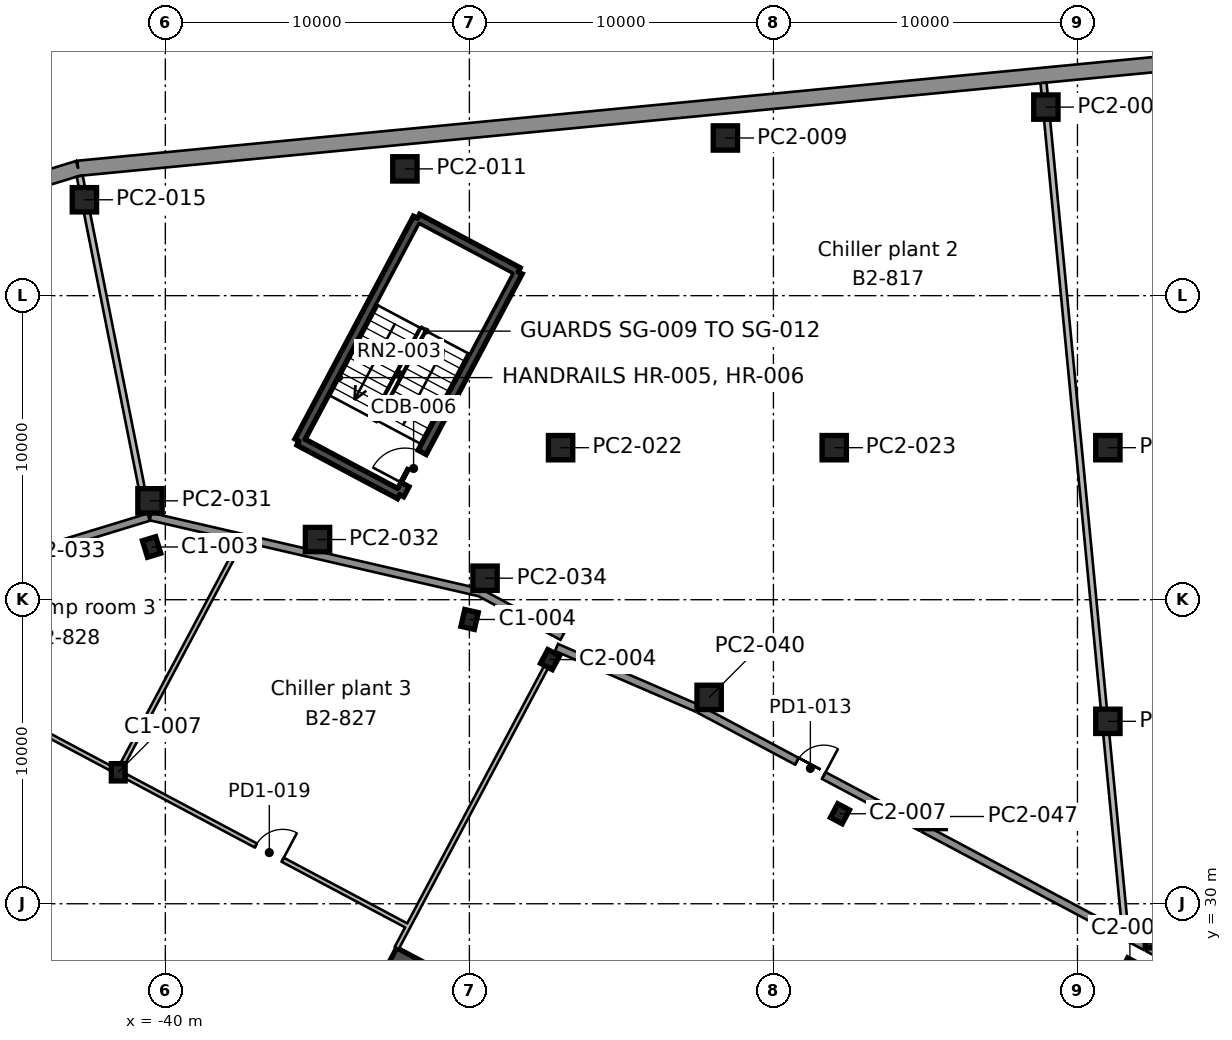
"""IFC4 building model, lengths in metres.
Left out: names, types, materials, properties, quantities, classifications, styles, units other than length and angle.
Written with IfcOpenShell. Run it as: python <this file> out.ifc"""

import sys

from ifc_helpers import new_model, si_unit, direction, frame, frame_2d, origin, origin_2d, place, context, subcontext, project, spatial, rectangle, i_section, extrude, element, fill, save


model = new_model("IFC4")
c1 = context("Model", 3, precision=1e-05, world=origin(), true_north=direction((0.0, 1.0)))
c2 = subcontext(c1, "Body", "Model", "MODEL_VIEW")
j1 = project(units=[si_unit("LENGTHUNIT", "METRE"), si_unit("PLANEANGLEUNIT", "RADIAN")], contexts=[c1])
p1 = place(None, origin())
s1 = spatial("IfcSite", under=j1, at=p1, CompositionType="ELEMENT")
p2 = place(p1, origin())
s2 = spatial("IfcBuilding", under=s1, at=p2, CompositionType="ELEMENT")
p3 = place(p2, frame((0.0, 0.0, -9.0)))
s3 = spatial("IfcBuildingStorey", under=s2, at=p3, CompositionType="ELEMENT", Elevation=-9.0)
for number, where, z_axis, x_axis in (
    (1, (-8.275, 27.89, 0.0), (0.0, 0.0, 1.0), (-0.883, 0.469, 0.0)),
    (2, (-17.811, 32.96, 0.0), (0.0, 0.0, 1.0), (-0.883, 0.469, 0.0)),
):
    element("IfcColumn", number, at=place(p3, frame(where, z_axis=z_axis, x_axis=x_axis)), inside=s3, PredefinedType="COLUMN", context=c2, shape_type="SweptSolid", body=[
        extrude(i_section(OverallWidth=0.437, OverallDepth=0.513, WebThickness=0.061, FlangeThickness=0.097, FilletRadius=0.015, at=origin_2d()), origin(), (0.0, 0.0, 1.0), 4.5),
    ])
p4 = place(p3, frame((-41.549, 34.324, 0.0), z_axis=(0.0, 0.0, 1.0), x_axis=(1.0, 0.0, 0.0)))
e3 = element("IfcColumn", 3, at=p4, inside=s3, PredefinedType="COLUMN", context=c2, shape_type="SweptSolid", body=[
    extrude(i_section(OverallWidth=0.455, OverallDepth=0.569, WebThickness=0.078, FlangeThickness=0.125, FilletRadius=0.015, at=origin_2d()), origin(), (0.0, 0.0, 1.0), 4.5),
])
p5 = place(p3, frame((-27.347, 38.03, 0.0), z_axis=(0.0, 0.0, 1.0), x_axis=(-0.882947592859, 0.469471562786, 0.0)))
e4 = element("IfcColumn", 4, at=p5, inside=s3, PredefinedType="COLUMN", context=c2, shape_type="SweptSolid", body=[
    extrude(i_section(OverallWidth=0.437, OverallDepth=0.513, WebThickness=0.061, FlangeThickness=0.097, FilletRadius=0.015, at=origin_2d()), origin(), (0.0, 0.0, 1.0), 4.5),
])
for number, where, z_axis, x_axis in (
    (5, (-29.993, 39.35, 0.0), (0.0, 0.0, 1.0), (-0.974, 0.225, 0.0)),
    (6, (-40.452, 41.734, 0.0), (0.0, 0.0, 1.0), (-0.956, -0.292, 0.0)),
):
    element("IfcColumn", number, at=place(p3, frame(where, z_axis=z_axis, x_axis=x_axis)), inside=s3, PredefinedType="COLUMN", context=c2, shape_type="SweptSolid", body=[
        extrude(i_section(OverallWidth=0.455, OverallDepth=0.569, WebThickness=0.078, FlangeThickness=0.125, FilletRadius=0.015, at=origin_2d()), origin(), (0.0, 0.0, 1.0), 4.5),
    ])
p6 = place(p3, frame((-31.992, 28.336, 0.0), z_axis=(0.0, 0.0, 1.0), x_axis=(-0.46947084998, -0.882947971864, 0.0)))
e7 = element("IfcWall", 7, at=p6, inside=s3, PredefinedType="SHEAR", context=c2, shape_type="SweptSolid", body=[
    extrude(rectangle(XDim=20.0, YDim=0.9, at=frame_2d((10.0, 0.0))), origin(), (0.0, 0.0, 1.0), 4.5),
])
p7 = place(p6, frame((10.6, 0.0, 0.0)))
e8 = element("IfcOpeningElement", 8, at=p7, cuts=e7, PredefinedType="OPENING", context=c2, shape_type="SweptSolid", body=[
    extrude(rectangle(XDim=2.4, YDim=2.4, at=frame_2d((1.2, 1.2))), frame((0.0, 0.46, 0.0), z_axis=(0.0, -1.0, 0.0), x_axis=(1.0, 0.0, 0.0)), (0.0, 0.0, 1.0), 0.92),
])
p8 = place(p3, frame((-31.707, 52.544, 0.0), z_axis=(0.0, 0.0, 1.0), x_axis=(0.882948761726, -0.46946936446, 0.0)))
e9 = element("IfcWall", 9, at=p8, inside=s3, PredefinedType="SHEAR", context=c2, shape_type="SweptSolid", body=[
    extrude(rectangle(XDim=3.75, YDim=0.3, at=frame_2d((1.875, 0.0))), origin(), (0.0, 0.0, 1.0), 4.5),
])
p9 = place(p3, frame((-28.396, 50.784, 0.0), z_axis=(0.0, 0.0, 1.0), x_axis=(-0.469464178475, -0.882951519127, 0.0)))
e10 = element("IfcWall", 10, at=p9, inside=s3, PredefinedType="SHEAR", context=c2, shape_type="SweptSolid", body=[
    extrude(rectangle(XDim=8.3, YDim=0.3, at=frame_2d((4.15, 0.0))), origin(), (0.0, 0.0, 1.0), 4.5),
])
p10 = place(p9, frame((6.725, 0.0, 0.0)))
e11 = element("IfcOpeningElement", 11, at=p10, cuts=e10, PredefinedType="OPENING", context=c2, shape_type="SweptSolid", body=[
    extrude(rectangle(XDim=1.2, YDim=2.1, at=frame_2d((0.6, 1.05))), frame((0.0, 0.16, 0.0), z_axis=(0.0, -1.0, 0.0), x_axis=(1.0, 0.0, 0.0)), (0.0, 0.0, 1.0), 0.32),
])
p11 = place(p3, frame((-32.293, 43.456, 0.0), z_axis=(0.0, 0.0, 1.0), x_axis=(-0.882948761726, 0.46946936446, 0.0)))
e12 = element("IfcWall", 12, at=p11, inside=s3, PredefinedType="SHEAR", context=c2, shape_type="SweptSolid", body=[
    extrude(rectangle(XDim=3.75, YDim=0.3, at=frame_2d((1.875, 0.0))), origin(), (0.0, 0.0, 1.0), 4.5),
])
p12 = place(p3, frame((-35.604, 45.216, 0.0), z_axis=(0.0, 0.0, 1.0), x_axis=(0.469464178475, 0.882951519127, 0.0)))
e13 = element("IfcWall", 13, at=p12, inside=s3, PredefinedType="SHEAR", context=c2, shape_type="SweptSolid", body=[
    extrude(rectangle(XDim=8.3, YDim=0.3, at=frame_2d((4.15, 0.0))), origin(), (0.0, 0.0, 1.0), 4.5),
])
p13 = place(p3, frame((52.315, 63.363, 0.0), z_axis=(0.0, 0.0, 1.0), x_axis=(-0.995387233017, -0.095938815644, 0.0)))
e14 = element("IfcWall", 14, at=p13, inside=s3, PredefinedType="SOLIDWALL", context=c2, shape_type="SweptSolid", body=[
    extrude(rectangle(XDim=95.624, YDim=0.5, at=frame_2d((47.812, 0.0))), origin(), (0.0, 0.0, 1.0), 4.5),
])
p14 = place(p3, frame((-42.868, 54.189, 0.0), z_axis=(0.0, 0.0, 1.0), x_axis=(-0.956302408896, -0.292379381524, 0.0)))
e15 = element("IfcWall", 15, at=p14, inside=s3, PredefinedType="SOLIDWALL", context=c2, shape_type="SweptSolid", body=[
    extrude(rectangle(XDim=15.386, YDim=0.5, at=frame_2d((7.693, 0.0))), origin(), (0.0, 0.0, 1.0), 4.5),
])
for number, where, z_axis, x_axis in (
    (16, (-7.371, 28.949, 0.0), (0.0, 0.0, 1.0), (1.0, 0.0, 0.0)),
    (17, (-14.743, 32.869, 0.0), (0.0, 0.0, 1.0), (1.0, 0.0, 0.0)),
    (18, (-9.0, 36.0, 0.0), (0.0, 0.0, 1.0), (1.0, 0.0, 0.0)),
    (19, (-22.114, 36.788, 0.0), (0.0, 0.0, 1.0), (1.0, 0.0, 0.0)),
    (20, (-29.485, 40.707, 0.0), (0.0, 0.0, 1.0), (1.0, 0.0, 0.0)),
    (21, (-34.995, 41.979, 0.0), (0.0, 0.0, 1.0), (1.0, 0.0, 0.0)),
    (22, (-40.505, 43.252, 0.0), (0.0, 0.0, 1.0), (1.0, 0.0, 0.0)),
    (23, (-27.0, 45.0, 0.0), (0.0, 0.0, 1.0), (1.0, 0.0, 0.0)),
    (24, (-18.0, 45.0, 0.0), (0.0, 0.0, 1.0), (1.0, 0.0, 0.0)),
    (25, (-9.0, 45.0, 0.0), (0.0, 0.0, 1.0), (1.0, 0.0, 0.0)),
    (26, (-42.662, 53.154, 0.0), (0.0, 0.0, 1.0), (1.0, 0.0, 0.0)),
    (27, (-32.121, 54.17, 0.0), (0.0, 0.0, 1.0), (1.0, 0.0, 0.0)),
    (28, (-21.58, 55.186, 0.0), (0.0, 0.0, 1.0), (1.0, 0.0, 0.0)),
    (29, (-11.039, 56.202, 0.0), (0.0, 0.0, 1.0), (1.0, 0.0, 0.0)),
):
    element("IfcColumn", number, at=place(p3, frame(where, z_axis=z_axis, x_axis=x_axis)), inside=s3, PredefinedType="COLUMN", context=c2, shape_type="SweptSolid", body=[
        extrude(rectangle(XDim=0.8, YDim=0.8, at=origin_2d()), origin(), (0.0, 0.0, 1.0), 4.1),
    ])
p15 = place(p3, frame((-11.116, 56.998, 0.0), z_axis=(0.0, 0.0, 1.0), x_axis=(0.095794311802, -0.995401150203, 0.0)))
e30 = element("IfcWall", 30, at=p15, inside=s3, PredefinedType="PARTITIONING", context=c2, shape_type="SweptSolid", body=[
    extrude(rectangle(XDim=0.397, YDim=0.2, at=frame_2d((0.199, 0.0))), origin(), (0.0, 0.0, 1.0), 4.1),
])
p16 = place(p3, frame((-11.001, 55.802, 0.0), z_axis=(0.0, 0.0, 1.0), x_axis=(0.095942712783, -0.99538685739, 0.0)))
e31 = element("IfcWall", 31, at=p16, inside=s3, PredefinedType="PARTITIONING", context=c2, shape_type="SweptSolid", body=[
    extrude(rectangle(XDim=19.492, YDim=0.2, at=frame_2d((9.746, 0.0))), origin(), (0.0, 0.0, 1.0), 4.1),
])
p17 = place(p3, frame((-9.054, 35.6, 0.0), z_axis=(0.0, 0.0, 1.0), x_axis=(0.095939612703, -0.995387156193, 0.0)))
e32 = element("IfcWall", 32, at=p17, inside=s3, PredefinedType="PARTITIONING", context=c2, shape_type="SweptSolid", body=[
    extrude(rectangle(XDim=6.695, YDim=0.2, at=frame_2d((3.348, 0.0))), origin(), (0.0, 0.0, 1.0), 4.1),
])
p18 = place(p3, frame((-8.407, 28.933, 0.0), z_axis=(0.0, 0.0, 1.0), x_axis=(0.88302789325, -0.469320508547, 0.0)))
e33 = element("IfcWall", 33, at=p18, inside=s3, PredefinedType="SOLIDWALL", context=c2, shape_type="SweptSolid", body=[
    extrude(rectangle(XDim=0.72, YDim=0.25, at=frame_2d((0.36, 0.0))), origin(), (0.0, 0.0, 1.0), 4.1),
])
p19 = place(p3, frame((-7.684, 28.549, 0.0), z_axis=(0.0, 0.0, 1.0), x_axis=(0.882947828207, -0.46947112016, 0.0)))
e34 = element("IfcWall", 34, at=p19, inside=s3, PredefinedType="SOLIDWALL", context=c2, shape_type="SweptSolid", body=[
    extrude(rectangle(XDim=8.249, YDim=0.25, at=frame_2d((4.125, 0.0))), origin(), (0.0, 0.0, 1.0), 4.1),
])
p20 = place(p19, frame((3.625, 0.0, 0.0)))
e35 = element("IfcOpeningElement", 35, at=p20, cuts=e34, PredefinedType="OPENING", context=c2, shape_type="SweptSolid", body=[
    extrude(rectangle(XDim=1.0, YDim=2.1, at=frame_2d((0.5, 1.05))), frame((0.0, 0.135, 0.0), z_axis=(0.0, -1.0, 0.0), x_axis=(1.0, 0.0, 0.0)), (0.0, 0.0, 1.0), 0.27),
])
p21 = place(p3, frame((-42.817, 53.932, 0.0), z_axis=(0.0, 0.0, 1.0), x_axis=(0.194899081762, -0.980823301073, 0.0)))
e36 = element("IfcWall", 36, at=p21, inside=s3, PredefinedType="PARTITIONING", context=c2, shape_type="SweptSolid", body=[
    extrude(rectangle(XDim=0.386, YDim=0.2, at=frame_2d((0.193, 0.0))), origin(), (0.0, 0.0, 1.0), 4.1),
])
p22 = place(p3, frame((-42.583, 52.754, 0.0), z_axis=(0.0, 0.0, 1.0), x_axis=(0.195149741705, -0.980773459221, 0.0)))
e37 = element("IfcWall", 37, at=p22, inside=s3, PredefinedType="PARTITIONING", context=c2, shape_type="SweptSolid", body=[
    extrude(rectangle(XDim=9.28, YDim=0.2, at=frame_2d((4.64, 0.0))), origin(), (0.0, 0.0, 1.0), 4.1),
])
p23 = place(p3, frame((-37.45, 42.033, 0.0), z_axis=(0.0, 0.0, 1.0), x_axis=(0.97436957048, -0.224953195404, 0.0)))
e38 = element("IfcWall", 38, at=p23, inside=s3, PredefinedType="SOLIDWALL", context=c2, shape_type="SweptSolid", body=[
    extrude(rectangle(XDim=7.993, YDim=0.25, at=frame_2d((3.997, 0.0))), origin(), (0.0, 0.0, 1.0), 4.1),
])
p24 = place(p3, frame((-29.662, 40.235, 0.0), z_axis=(0.0, 0.0, 1.0), x_axis=(0.882951412921, -0.469464378224, 0.0)))
e39 = element("IfcWall", 39, at=p24, inside=s3, PredefinedType="SOLIDWALL", context=c2, shape_type="SweptSolid", body=[
    extrude(rectangle(XDim=3.079, YDim=0.25, at=frame_2d((1.54, 0.0))), origin(), (0.0, 0.0, 1.0), 4.1),
])
p25 = place(p3, frame((-40.487, 42.734, 0.0), z_axis=(0.0, 0.0, 1.0), x_axis=(0.974387235192, -0.224876668186, 0.0)))
e40 = element("IfcWall", 40, at=p25, inside=s3, PredefinedType="SOLIDWALL", context=c2, shape_type="SweptSolid", body=[
    extrude(rectangle(XDim=3.117, YDim=0.25, at=frame_2d((1.559, 0.0))), origin(), (0.0, 0.0, 1.0), 4.1),
])
p26 = place(p3, frame((-27.134, 38.43, 0.0), z_axis=(0.0, 0.0, 1.0), x_axis=(0.918029849315, -0.396511280756, 0.0)))
e41 = element("IfcWall", 41, at=p26, inside=s3, PredefinedType="SOLIDWALL", context=c2, shape_type="SweptSolid", body=[
    extrude(rectangle(XDim=5.033, YDim=0.25, at=frame_2d((2.517, 0.0))), origin(), (0.0, 0.0, 1.0), 4.1),
])
p27 = place(p3, frame((-22.427, 36.388, 0.0), z_axis=(0.0, 0.0, 1.0), x_axis=(0.882947828207, -0.46947112016, 0.0)))
e42 = element("IfcWall", 42, at=p27, inside=s3, PredefinedType="SOLIDWALL", context=c2, shape_type="SweptSolid", body=[
    extrude(rectangle(XDim=8.249, YDim=0.25, at=frame_2d((4.125, 0.0))), origin(), (0.0, 0.0, 1.0), 4.1),
])
p28 = place(p27, frame((3.625, 0.0, 0.0)))
e43 = element("IfcOpeningElement", 43, at=p28, cuts=e42, PredefinedType="OPENING", context=c2, shape_type="SweptSolid", body=[
    extrude(rectangle(XDim=1.0, YDim=2.1, at=frame_2d((0.5, 1.05))), frame((0.0, 0.135, 0.0), z_axis=(0.0, -1.0, 0.0), x_axis=(1.0, 0.0, 0.0)), (0.0, 0.0, 1.0), 0.27),
])
p29 = place(p3, frame((-15.056, 32.469, 0.0), z_axis=(0.0, 0.0, 1.0), x_axis=(0.882954463929, -0.469458639954, 0.0)))
e44 = element("IfcWall", 44, at=p29, inside=s3, PredefinedType="SOLIDWALL", context=c2, shape_type="SweptSolid", body=[
    extrude(rectangle(XDim=7.53, YDim=0.25, at=frame_2d((3.765, 0.0))), origin(), (0.0, 0.0, 1.0), 4.1),
])
p30 = place(p3, frame((-51.19, 39.462, 0.0), z_axis=(0.0, 0.0, 1.0), x_axis=(0.956306774144, 0.29236510347, 0.0)))
e45 = element("IfcWall", 45, at=p30, inside=s3, PredefinedType="SOLIDWALL", context=c2, shape_type="SweptSolid", body=[
    extrude(rectangle(XDim=11.13, YDim=0.25, at=frame_2d((5.565, 0.0))), origin(), (0.0, 0.0, 1.0), 4.1),
])
p31 = place(p3, frame((-32.013, 29.254, 0.0), z_axis=(0.0, 0.0, 1.0), x_axis=(-0.882951328121, 0.469464537713, 0.0)))
e46 = element("IfcWall", 46, at=p31, inside=s3, PredefinedType="PARTITIONING", context=c2, shape_type="SweptSolid", body=[
    extrude(rectangle(XDim=10.502, YDim=0.15, at=frame_2d((5.251, 0.0))), origin(), (0.0, 0.0, 1.0), 4.1),
])
p32 = place(p31, frame((4.673, 0.0, 0.0)))
e47 = element("IfcOpeningElement", 47, at=p32, cuts=e46, PredefinedType="OPENING", context=c2, shape_type="SweptSolid", body=[
    extrude(rectangle(XDim=1.0, YDim=2.1, at=frame_2d((0.5, 1.05))), frame((0.0, 0.085, 0.0), z_axis=(0.0, -1.0, 0.0), x_axis=(1.0, 0.0, 0.0)), (0.0, 0.0, 1.0), 0.17),
])
p33 = place(p3, frame((-41.812, 34.463, 0.0), z_axis=(0.0, 0.0, 1.0), x_axis=(-0.882945529205, 0.469475443935, 0.0)))
e48 = element("IfcWall", 48, at=p33, inside=s3, PredefinedType="PARTITIONING", context=c2, shape_type="SweptSolid", body=[
    extrude(rectangle(XDim=9.569, YDim=0.15, at=frame_2d((4.784, 0.0))), origin(), (0.0, 0.0, 1.0), 4.1),
])
p34 = place(p33, frame((4.362, 0.0, 0.0)))
e49 = element("IfcOpeningElement", 49, at=p34, cuts=e48, PredefinedType="OPENING", context=c2, shape_type="SweptSolid", body=[
    extrude(rectangle(XDim=1.0, YDim=2.1, at=frame_2d((0.5, 1.05))), frame((0.0, 0.085, 0.0), z_axis=(0.0, -1.0, 0.0), x_axis=(1.0, 0.0, 0.0)), (0.0, 0.0, 1.0), 0.17),
])
p35 = place(p3, frame((-32.389, 28.547, 0.0), z_axis=(0.0, 0.0, 1.0), x_axis=(0.469582372655, 0.882888665287, 0.0)))
e50 = element("IfcWall", 50, at=p35, inside=s3, PredefinedType="PARTITIONING", context=c2, shape_type="SweptSolid", body=[
    extrude(rectangle(XDim=0.794, YDim=0.15, at=frame_2d((0.397, 0.0))), origin(), (0.0, 0.0, 1.0), 4.1),
])
p36 = place(p3, frame((-37.45, 42.033, 0.0), z_axis=(0.0, 0.0, 1.0), x_axis=(-0.46946644805, -0.882950312393, 0.0)))
e51 = element("IfcWall", 51, at=p36, inside=s3, PredefinedType="PARTITIONING", context=c2, shape_type="SweptSolid", body=[
    extrude(rectangle(XDim=8.373, YDim=0.15, at=frame_2d((4.187, 0.0))), origin(), (0.0, 0.0, 1.0), 4.1),
])
p37 = place(p3, frame((-32.015, 29.25, 0.0), z_axis=(0.0, 0.0, 1.0), x_axis=(0.469462919124, 0.882952188721, 0.0)))
e52 = element("IfcWall", 52, at=p37, inside=s3, PredefinedType="PARTITIONING", context=c2, shape_type="SweptSolid", body=[
    extrude(rectangle(XDim=9.687, YDim=0.15, at=frame_2d((4.844, 0.0))), origin(), (0.0, 0.0, 1.0), 4.1),
])
p38 = place(p10, frame((1.2, 0.0, 0.0), z_axis=(0.0, 0.0, 1.0), x_axis=(-1.0, 0.0, 0.0)))
e53 = element("IfcDoor", 53, at=p38, inside=s3, OperationType="SINGLE_SWING_LEFT", PredefinedType="DOOR", context=c2, shape_type="SweptSolid", body=[
    extrude(rectangle(XDim=1.2, YDim=2.1, at=frame_2d((0.6, 1.05))), frame((0.0, 0.025, 0.0), z_axis=(0.0, -1.0, 0.0), x_axis=(1.0, 0.0, 0.0)), (0.0, 0.0, 1.0), 0.05),
])
fill(e11, e53)
p39 = place(p32, frame((1.0, 0.0, 0.0), z_axis=(0.0, 0.0, 1.0), x_axis=(-1.0, 0.0, 0.0)))
e54 = element("IfcDoor", 54, at=p39, inside=s3, OperationType="SINGLE_SWING_RIGHT", PredefinedType="DOOR", context=c2, shape_type="SweptSolid", body=[
    extrude(rectangle(XDim=1.0, YDim=2.1, at=frame_2d((0.5, 1.05))), frame((0.0, 0.025, 0.0), z_axis=(0.0, -1.0, 0.0), x_axis=(1.0, 0.0, 0.0)), (0.0, 0.0, 1.0), 0.05),
])
fill(e47, e54)
p40 = place(p28, origin())
e55 = element("IfcDoor", 55, at=p40, inside=s3, OperationType="SINGLE_SWING_RIGHT", PredefinedType="DOOR", context=c2, shape_type="SweptSolid", body=[
    extrude(rectangle(XDim=1.0, YDim=2.1, at=frame_2d((0.5, 1.05))), frame((0.0, 0.025, 0.0), z_axis=(0.0, -1.0, 0.0), x_axis=(1.0, 0.0, 0.0)), (0.0, 0.0, 1.0), 0.05),
])
fill(e43, e55)
save(model, sys.argv[1])
